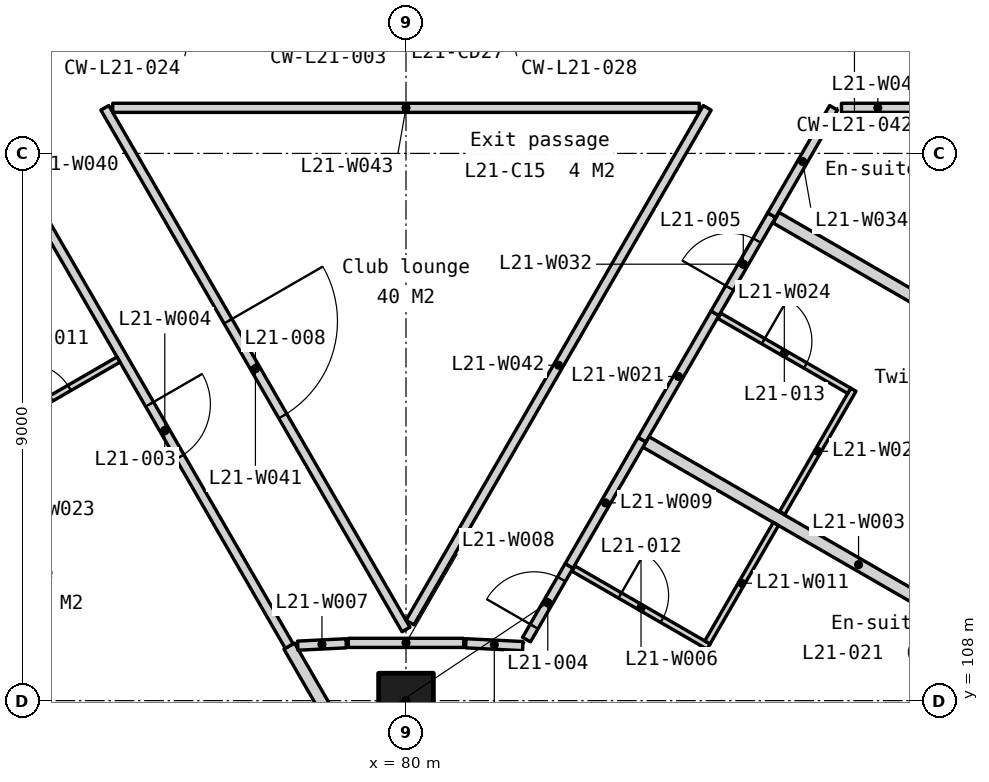
"""IFC4 building model, lengths in metres.
Left out: names, types, materials, properties, quantities, classifications, styles, units other than length and angle.
Written with IfcOpenShell. Run it as: python <this file> out.ifc"""

import sys

from ifc_helpers import new_model, si_unit, direction, frame, frame_2d, origin, origin_2d, place, context, subcontext, project, spatial, polyline, rectangle, outline, extrude, element, fill, save


model = new_model("IFC4")
c1 = context("Model", 3, precision=1e-05, world=origin(), true_north=direction((0.0, 1.0)))
c2 = subcontext(c1, "Body", "Model", "MODEL_VIEW")
j1 = project(units=[si_unit("LENGTHUNIT", "METRE"), si_unit("PLANEANGLEUNIT", "RADIAN")], contexts=[c1])
p1 = place(None, origin())
s1 = spatial("IfcSite", under=j1, at=p1, CompositionType="ELEMENT")
p2 = place(p1, origin())
s2 = spatial("IfcBuilding", under=s1, at=p2, CompositionType="ELEMENT")
p3 = place(p2, frame((0.0, 0.0, 88.8)))
s3 = spatial("IfcBuildingStorey", under=s2, at=p3, CompositionType="ELEMENT", Elevation=88.8)
p4 = place(p3, frame((80.0, 108.0, 0.0), z_axis=(0.0, 0.0, 1.0), x_axis=(1.0, 0.0, 0.0)))
e1 = element("IfcColumn", 1, at=p4, inside=s3, PredefinedType="COLUMN", context=c2, shape_type="SweptSolid", body=[
    extrude(rectangle(XDim=0.9, YDim=0.9, at=origin_2d()), origin(), (0.0, 0.0, 1.0), 3.5),
])
p5 = place(p3, frame((56.073, 130.263, -0.15), z_axis=(0.0, 0.0, 1.0), x_axis=(0.500000478905, -0.866025127289, 0.0)))
e2 = element("IfcWall", 2, at=p5, inside=s3, PredefinedType="SOLIDWALL", context=c2, shape_type="SweptSolid", body=[
    extrude(outline(polyline([(42.643, 0.0), (42.643, 3.5), (0.0, 3.5), (0.0, 0.0), (42.643, 0.0)])), frame((0.0, 0.225, 0.0), z_axis=(0.0, -1.0, 0.0), x_axis=(1.0, 0.0, 0.0)), (0.0, 0.0, 1.0), 0.45),
])
p6 = place(p5, frame((0.72, 0.0, 1.05)))
e3 = element("IfcOpeningElement", 3, at=p6, cuts=e2, PredefinedType="OPENING", context=c2, shape_type="SweptSolid", body=[
    extrude(rectangle(XDim=1.2, YDim=1.5, at=frame_2d((0.6, 0.75))), frame((0.0, 0.235, 0.0), z_axis=(0.0, -1.0, 0.0), x_axis=(1.0, 0.0, 0.0)), (0.0, 0.0, 1.0), 0.47),
])
p7 = place(p5, frame((7.079, 0.0, 1.05)))
e4 = element("IfcOpeningElement", 4, at=p7, cuts=e2, PredefinedType="OPENING", context=c2, shape_type="SweptSolid", body=[
    extrude(rectangle(XDim=1.2, YDim=1.5, at=frame_2d((0.6, 0.75))), frame((0.0, 0.235, 0.0), z_axis=(0.0, -1.0, 0.0), x_axis=(1.0, 0.0, 0.0)), (0.0, 0.0, 1.0), 0.47),
])
p8 = place(p5, frame((8.779, 0.0, 1.05)))
e5 = element("IfcOpeningElement", 5, at=p8, cuts=e2, PredefinedType="OPENING", context=c2, shape_type="SweptSolid", body=[
    extrude(rectangle(XDim=1.2, YDim=1.5, at=frame_2d((0.6, 0.75))), frame((0.0, 0.235, 0.0), z_axis=(0.0, -1.0, 0.0), x_axis=(1.0, 0.0, 0.0)), (0.0, 0.0, 1.0), 0.47),
])
p9 = place(p5, frame((15.607, 0.0, 1.05)))
e6 = element("IfcOpeningElement", 6, at=p9, cuts=e2, PredefinedType="OPENING", context=c2, shape_type="SweptSolid", body=[
    extrude(rectangle(XDim=1.2, YDim=1.5, at=frame_2d((0.6, 0.75))), frame((0.0, 0.235, 0.0), z_axis=(0.0, -1.0, 0.0), x_axis=(1.0, 0.0, 0.0)), (0.0, 0.0, 1.0), 0.47),
])
p10 = place(p5, frame((17.307, 0.0, 1.05)))
e7 = element("IfcOpeningElement", 7, at=p10, cuts=e2, PredefinedType="OPENING", context=c2, shape_type="SweptSolid", body=[
    extrude(rectangle(XDim=1.2, YDim=1.5, at=frame_2d((0.6, 0.75))), frame((0.0, 0.235, 0.0), z_axis=(0.0, -1.0, 0.0), x_axis=(1.0, 0.0, 0.0)), (0.0, 0.0, 1.0), 0.47),
])
p11 = place(p5, frame((24.136, 0.0, 1.05)))
e8 = element("IfcOpeningElement", 8, at=p11, cuts=e2, PredefinedType="OPENING", context=c2, shape_type="SweptSolid", body=[
    extrude(rectangle(XDim=1.2, YDim=1.5, at=frame_2d((0.6, 0.75))), frame((0.0, 0.235, 0.0), z_axis=(0.0, -1.0, 0.0), x_axis=(1.0, 0.0, 0.0)), (0.0, 0.0, 1.0), 0.47),
])
p12 = place(p5, frame((25.836, 0.0, 1.05)))
e9 = element("IfcOpeningElement", 9, at=p12, cuts=e2, PredefinedType="OPENING", context=c2, shape_type="SweptSolid", body=[
    extrude(rectangle(XDim=1.2, YDim=1.5, at=frame_2d((0.6, 0.75))), frame((0.0, 0.235, 0.0), z_axis=(0.0, -1.0, 0.0), x_axis=(1.0, 0.0, 0.0)), (0.0, 0.0, 1.0), 0.47),
])
p13 = place(p5, frame((32.665, 0.0, 1.05)))
e10 = element("IfcOpeningElement", 10, at=p13, cuts=e2, PredefinedType="OPENING", context=c2, shape_type="SweptSolid", body=[
    extrude(rectangle(XDim=1.2, YDim=1.5, at=frame_2d((0.6, 0.75))), frame((0.0, 0.235, 0.0), z_axis=(0.0, -1.0, 0.0), x_axis=(1.0, 0.0, 0.0)), (0.0, 0.0, 1.0), 0.47),
])
p14 = place(p5, frame((34.365, 0.0, 1.05)))
e11 = element("IfcOpeningElement", 11, at=p14, cuts=e2, PredefinedType="OPENING", context=c2, shape_type="SweptSolid", body=[
    extrude(rectangle(XDim=1.2, YDim=1.5, at=frame_2d((0.6, 0.75))), frame((0.0, 0.235, 0.0), z_axis=(0.0, -1.0, 0.0), x_axis=(1.0, 0.0, 0.0)), (0.0, 0.0, 1.0), 0.47),
])
p15 = place(p5, frame((40.722, 0.0, 1.05)))
e12 = element("IfcOpeningElement", 12, at=p15, cuts=e2, PredefinedType="OPENING", context=c2, shape_type="SweptSolid", body=[
    extrude(rectangle(XDim=1.2, YDim=1.5, at=frame_2d((0.6, 0.75))), frame((0.0, 0.235, 0.0), z_axis=(0.0, -1.0, 0.0), x_axis=(1.0, 0.0, 0.0)), (0.0, 0.0, 1.0), 0.47),
])
p16 = place(p3, frame((82.605, 93.333, -0.15), z_axis=(0.0, 0.0, 1.0), x_axis=(0.500000478905, 0.866025127289, 0.0)))
e13 = element("IfcWall", 13, at=p16, inside=s3, PredefinedType="SOLIDWALL", context=c2, shape_type="SweptSolid", body=[
    extrude(outline(polyline([(42.643, 0.0), (42.643, 3.5), (0.0, 3.5), (0.0, 0.0), (42.643, 0.0)])), frame((0.0, 0.225, 0.0), z_axis=(0.0, -1.0, 0.0), x_axis=(1.0, 0.0, 0.0)), (0.0, 0.0, 1.0), 0.45),
])
p17 = place(p16, frame((0.72, 0.0, 1.05)))
e14 = element("IfcOpeningElement", 14, at=p17, cuts=e13, PredefinedType="OPENING", context=c2, shape_type="SweptSolid", body=[
    extrude(rectangle(XDim=1.2, YDim=1.5, at=frame_2d((0.6, 0.75))), frame((0.0, 0.235, 0.0), z_axis=(0.0, -1.0, 0.0), x_axis=(1.0, 0.0, 0.0)), (0.0, 0.0, 1.0), 0.47),
])
p18 = place(p16, frame((7.079, 0.0, 1.05)))
e15 = element("IfcOpeningElement", 15, at=p18, cuts=e13, PredefinedType="OPENING", context=c2, shape_type="SweptSolid", body=[
    extrude(rectangle(XDim=1.2, YDim=1.5, at=frame_2d((0.6, 0.75))), frame((0.0, 0.235, 0.0), z_axis=(0.0, -1.0, 0.0), x_axis=(1.0, 0.0, 0.0)), (0.0, 0.0, 1.0), 0.47),
])
p19 = place(p16, frame((8.779, 0.0, 1.05)))
e16 = element("IfcOpeningElement", 16, at=p19, cuts=e13, PredefinedType="OPENING", context=c2, shape_type="SweptSolid", body=[
    extrude(rectangle(XDim=1.2, YDim=1.5, at=frame_2d((0.6, 0.75))), frame((0.0, 0.235, 0.0), z_axis=(0.0, -1.0, 0.0), x_axis=(1.0, 0.0, 0.0)), (0.0, 0.0, 1.0), 0.47),
])
p20 = place(p16, frame((15.607, 0.0, 1.05)))
e17 = element("IfcOpeningElement", 17, at=p20, cuts=e13, PredefinedType="OPENING", context=c2, shape_type="SweptSolid", body=[
    extrude(rectangle(XDim=1.2, YDim=1.5, at=frame_2d((0.6, 0.75))), frame((0.0, 0.235, 0.0), z_axis=(0.0, -1.0, 0.0), x_axis=(1.0, 0.0, 0.0)), (0.0, 0.0, 1.0), 0.47),
])
p21 = place(p16, frame((17.307, 0.0, 1.05)))
e18 = element("IfcOpeningElement", 18, at=p21, cuts=e13, PredefinedType="OPENING", context=c2, shape_type="SweptSolid", body=[
    extrude(rectangle(XDim=1.2, YDim=1.5, at=frame_2d((0.6, 0.75))), frame((0.0, 0.235, 0.0), z_axis=(0.0, -1.0, 0.0), x_axis=(1.0, 0.0, 0.0)), (0.0, 0.0, 1.0), 0.47),
])
p22 = place(p16, frame((24.136, 0.0, 1.05)))
e19 = element("IfcOpeningElement", 19, at=p22, cuts=e13, PredefinedType="OPENING", context=c2, shape_type="SweptSolid", body=[
    extrude(rectangle(XDim=1.2, YDim=1.5, at=frame_2d((0.6, 0.75))), frame((0.0, 0.235, 0.0), z_axis=(0.0, -1.0, 0.0), x_axis=(1.0, 0.0, 0.0)), (0.0, 0.0, 1.0), 0.47),
])
p23 = place(p16, frame((25.836, 0.0, 1.05)))
e20 = element("IfcOpeningElement", 20, at=p23, cuts=e13, PredefinedType="OPENING", context=c2, shape_type="SweptSolid", body=[
    extrude(rectangle(XDim=1.2, YDim=1.5, at=frame_2d((0.6, 0.75))), frame((0.0, 0.235, 0.0), z_axis=(0.0, -1.0, 0.0), x_axis=(1.0, 0.0, 0.0)), (0.0, 0.0, 1.0), 0.47),
])
p24 = place(p16, frame((32.665, 0.0, 1.05)))
e21 = element("IfcOpeningElement", 21, at=p24, cuts=e13, PredefinedType="OPENING", context=c2, shape_type="SweptSolid", body=[
    extrude(rectangle(XDim=1.2, YDim=1.5, at=frame_2d((0.6, 0.75))), frame((0.0, 0.235, 0.0), z_axis=(0.0, -1.0, 0.0), x_axis=(1.0, 0.0, 0.0)), (0.0, 0.0, 1.0), 0.47),
])
p25 = place(p16, frame((34.365, 0.0, 1.05)))
e22 = element("IfcOpeningElement", 22, at=p25, cuts=e13, PredefinedType="OPENING", context=c2, shape_type="SweptSolid", body=[
    extrude(rectangle(XDim=1.2, YDim=1.5, at=frame_2d((0.6, 0.75))), frame((0.0, 0.235, 0.0), z_axis=(0.0, -1.0, 0.0), x_axis=(1.0, 0.0, 0.0)), (0.0, 0.0, 1.0), 0.47),
])
p26 = place(p16, frame((40.722, 0.0, 1.05)))
e23 = element("IfcOpeningElement", 23, at=p26, cuts=e13, PredefinedType="OPENING", context=c2, shape_type="SweptSolid", body=[
    extrude(rectangle(XDim=1.2, YDim=1.5, at=frame_2d((0.6, 0.75))), frame((0.0, 0.235, 0.0), z_axis=(0.0, -1.0, 0.0), x_axis=(1.0, 0.0, 0.0)), (0.0, 0.0, 1.0), 0.47),
])
p27 = place(p3, frame((78.079, 108.897, 0.0), z_axis=(0.0, 0.0, 1.0), x_axis=(0.499981580887, -0.866036037803, 0.0)))
e24 = element("IfcWall", 24, at=p27, inside=s3, PredefinedType="PARTITIONING", context=c2, shape_type="SweptSolid", body=[
    extrude(rectangle(XDim=5.002, YDim=0.2, at=frame_2d((2.501, 0.0))), origin(), (0.0, 0.0, 1.0), 3.35),
])
p28 = place(p3, frame((83.946, 112.255, 0.0), z_axis=(0.0, 0.0, 1.0), x_axis=(0.86603353517, -0.499985915763, 0.0)))
e25 = element("IfcWall", 25, at=p28, inside=s3, PredefinedType="PARTITIONING", context=c2, shape_type="SweptSolid", body=[
    extrude(rectangle(XDim=8.075, YDim=0.2, at=frame_2d((4.038, 0.0))), origin(), (0.0, 0.0, 1.0), 3.35),
])
p29 = place(p3, frame((73.987, 115.985, 0.0), z_axis=(0.0, 0.0, 1.0), x_axis=(0.499995293736, -0.86602812093, 0.0)))
e26 = element("IfcWall", 26, at=p29, inside=s3, PredefinedType="PARTITIONING", context=c2, shape_type="SweptSolid", body=[
    extrude(rectangle(XDim=8.185, YDim=0.15, at=frame_2d((4.092, 0.0))), origin(), (0.0, 0.0, 1.0), 3.35),
])
p30 = place(p29, frame((3.592, 0.0, 0.0)))
e27 = element("IfcOpeningElement", 27, at=p30, cuts=e26, PredefinedType="OPENING", context=c2, shape_type="SweptSolid", body=[
    extrude(rectangle(XDim=1.0, YDim=2.1, at=frame_2d((0.5, 1.05))), frame((0.0, 0.085, 0.0), z_axis=(0.0, -1.0, 0.0), x_axis=(1.0, 0.0, 0.0)), (0.0, 0.0, 1.0), 0.17),
])
p31 = place(p3, frame((80.983, 108.943, 0.0), z_axis=(0.0, 0.0, 1.0), x_axis=(0.998790324739, -0.049172016508, 0.0)))
e28 = element("IfcWall", 28, at=p31, inside=s3, PredefinedType="PARTITIONING", context=c2, shape_type="SweptSolid", body=[
    extrude(rectangle(XDim=0.938, YDim=0.15, at=frame_2d((0.469, 0.0))), origin(), (0.0, 0.0, 1.0), 3.35),
])
p32 = place(p3, frame((82.754, 110.171, 0.0), z_axis=(0.0, 0.0, 1.0), x_axis=(0.866038183914, -0.499977863513, 0.0)))
e29 = element("IfcWall", 29, at=p32, inside=s3, PredefinedType="PARTITIONING", context=c2, shape_type="SweptSolid", body=[
    extrude(rectangle(XDim=2.565, YDim=0.1, at=frame_2d((1.282, 0.0))), origin(), (0.0, 0.0, 1.0), 3.35),
])
p33 = place(p32, frame((0.883, 0.0, 0.0)))
e30 = element("IfcOpeningElement", 30, at=p33, cuts=e29, PredefinedType="OPENING", context=c2, shape_type="SweptSolid", body=[
    extrude(rectangle(XDim=0.8, YDim=2.1, at=frame_2d((0.4, 1.05))), frame((0.0, 0.06, 0.0), z_axis=(0.0, -1.0, 0.0), x_axis=(1.0, 0.0, 0.0)), (0.0, 0.0, 1.0), 0.12),
])
p34 = place(p3, frame((78.219, 108.904, 0.0), z_axis=(0.0, 0.0, 1.0), x_axis=(0.998787173297, 0.049235987416, 0.0)))
e31 = element("IfcWall", 31, at=p34, inside=s3, PredefinedType="PARTITIONING", context=c2, shape_type="SweptSolid", body=[
    extrude(rectangle(XDim=0.798, YDim=0.15, at=frame_2d((0.399, 0.0))), origin(), (0.0, 0.0, 1.0), 3.35),
])
p35 = place(p3, frame((79.05, 108.95, 0.0), z_axis=(0.0, 0.0, 1.0), x_axis=(1.0, 0.0, 0.0)))
e32 = element("IfcWall", 32, at=p35, inside=s3, PredefinedType="PARTITIONING", context=c2, shape_type="SweptSolid", body=[
    extrude(rectangle(XDim=1.9, YDim=0.15, at=frame_2d((0.95, 0.0))), origin(), (0.0, 0.0, 1.0), 3.35),
])
p36 = place(p3, frame((82.681, 110.214, 0.0), z_axis=(0.0, 0.0, 1.0), x_axis=(0.500001309137, 0.866024647952, 0.0)))
e33 = element("IfcWall", 33, at=p36, inside=s3, PredefinedType="PARTITIONING", context=c2, shape_type="SweptSolid", body=[
    extrude(rectangle(XDim=2.4, YDim=0.15, at=frame_2d((1.2, 0.0))), origin(), (0.0, 0.0, 1.0), 3.35),
])
p37 = place(p3, frame((81.982, 109.004, 0.0), z_axis=(0.0, 0.0, 1.0), x_axis=(0.500009789943, 0.866019751484, 0.0)))
e34 = element("IfcWall", 34, at=p37, inside=s3, PredefinedType="PARTITIONING", context=c2, shape_type="SweptSolid", body=[
    extrude(rectangle(XDim=1.397, YDim=0.15, at=frame_2d((0.699, 0.0))), origin(), (0.0, 0.0, 1.0), 3.35),
])
p38 = place(p37, frame((0.249, 0.0, 0.0)))
e35 = element("IfcOpeningElement", 35, at=p38, cuts=e34, PredefinedType="OPENING", context=c2, shape_type="SweptSolid", body=[
    extrude(rectangle(XDim=0.9, YDim=2.1, at=frame_2d((0.45, 1.05))), frame((0.0, 0.085, 0.0), z_axis=(0.0, -1.0, 0.0), x_axis=(1.0, 0.0, 0.0)), (0.0, 0.0, 1.0), 0.17),
])
p39 = place(p3, frame((84.958, 108.957, 0.0), z_axis=(0.0, 0.0, 1.0), x_axis=(0.499966648284, 0.866044658551, 0.0)))
e36 = element("IfcWall", 36, at=p39, inside=s3, PredefinedType="PARTITIONING", context=c2, shape_type="SweptSolid", body=[
    extrude(rectangle(XDim=2.25, YDim=0.1, at=frame_2d((1.125, 0.0))), origin(), (0.0, 0.0, 1.0), 3.35),
])
p40 = place(p3, frame((86.087, 115.943, 0.0), z_axis=(0.0, 0.0, 1.0), x_axis=(0.866010152247, -0.500026415507, 0.0)))
e37 = element("IfcWall", 37, at=p40, inside=s3, PredefinedType="PARTITIONING", context=c2, shape_type="SweptSolid", body=[
    extrude(rectangle(XDim=8.065, YDim=0.2, at=frame_2d((4.032, 0.0))), origin(), (0.0, 0.0, 1.0), 3.35),
])
p41 = place(p3, frame((83.881, 112.292, 0.0), z_axis=(0.0, 0.0, 1.0), x_axis=(0.500001309137, 0.866024647952, 0.0)))
e38 = element("IfcWall", 38, at=p41, inside=s3, PredefinedType="PARTITIONING", context=c2, shape_type="SweptSolid", body=[
    extrude(rectangle(XDim=2.4, YDim=0.15, at=frame_2d((1.2, 0.0))), origin(), (0.0, 0.0, 1.0), 3.35),
])
p42 = place(p3, frame((86.188, 111.088, 0.0), z_axis=(0.0, 0.0, 1.0), x_axis=(0.499999433879, 0.866025730634, 0.0)))
e39 = element("IfcWall", 39, at=p42, inside=s3, PredefinedType="PARTITIONING", context=c2, shape_type="SweptSolid", body=[
    extrude(rectangle(XDim=2.34, YDim=0.1, at=frame_2d((1.17, 0.0))), origin(), (0.0, 0.0, 1.0), 3.35),
])
p43 = place(p3, frame((72.964, 112.277, 0.0), z_axis=(0.0, 0.0, 1.0), x_axis=(0.866075755805, 0.4999127776, 0.0)))
e40 = element("IfcWall", 40, at=p43, inside=s3, PredefinedType="PARTITIONING", context=c2, shape_type="SweptSolid", body=[
    extrude(rectangle(XDim=2.665, YDim=0.1, at=frame_2d((1.333, 0.0))), origin(), (0.0, 0.0, 1.0), 3.35),
])
p44 = place(p43, frame((0.933, 0.0, 0.0)))
e41 = element("IfcOpeningElement", 41, at=p44, cuts=e40, PredefinedType="OPENING", context=c2, shape_type="SweptSolid", body=[
    extrude(rectangle(XDim=0.8, YDim=2.1, at=frame_2d((0.4, 1.05))), frame((0.0, 0.06, 0.0), z_axis=(0.0, -1.0, 0.0), x_axis=(1.0, 0.0, 0.0)), (0.0, 0.0, 1.0), 0.12),
])
p45 = place(p3, frame((85.154, 114.328, 0.0), z_axis=(0.0, 0.0, 1.0), x_axis=(0.866040446274, -0.499973944738, 0.0)))
e42 = element("IfcWall", 42, at=p45, inside=s3, PredefinedType="PARTITIONING", context=c2, shape_type="SweptSolid", body=[
    extrude(rectangle(XDim=2.465, YDim=0.1, at=frame_2d((1.232, 0.0))), origin(), (0.0, 0.0, 1.0), 3.35),
])
p46 = place(p45, frame((0.833, 0.0, 0.0)))
e43 = element("IfcOpeningElement", 43, at=p46, cuts=e42, PredefinedType="OPENING", context=c2, shape_type="SweptSolid", body=[
    extrude(rectangle(XDim=0.8, YDim=2.1, at=frame_2d((0.4, 1.05))), frame((0.0, 0.06, 0.0), z_axis=(0.0, -1.0, 0.0), x_axis=(1.0, 0.0, 0.0)), (0.0, 0.0, 1.0), 0.12),
])
p47 = place(p3, frame((85.081, 114.371, 0.0), z_axis=(0.0, 0.0, 1.0), x_axis=(0.499941596792, 0.866059120267, 0.0)))
e44 = element("IfcWall", 44, at=p47, inside=s3, PredefinedType="PARTITIONING", context=c2, shape_type="SweptSolid", body=[
    extrude(rectangle(XDim=1.865, YDim=0.15, at=frame_2d((0.932, 0.0))), origin(), (0.0, 0.0, 1.0), 3.35),
])
p48 = place(p47, frame((0.482, 0.0, 0.0)))
e45 = element("IfcOpeningElement", 45, at=p48, cuts=e44, PredefinedType="OPENING", context=c2, shape_type="SweptSolid", body=[
    extrude(rectangle(XDim=0.9, YDim=2.1, at=frame_2d((0.45, 1.05))), frame((0.0, 0.085, 0.0), z_axis=(0.0, -1.0, 0.0), x_axis=(1.0, 0.0, 0.0)), (0.0, 0.0, 1.0), 0.17),
])
p49 = place(p3, frame((86.013, 115.985, 0.0), z_axis=(0.0, 0.0, 1.0), x_axis=(0.499992114976, 0.866029956157, 0.0)))
e46 = element("IfcWall", 46, at=p49, inside=s3, PredefinedType="PARTITIONING", context=c2, shape_type="SweptSolid", body=[
    extrude(rectangle(XDim=2.038, YDim=0.15, at=frame_2d((1.019, 0.0))), origin(), (0.0, 0.0, 1.0), 3.35),
])
p50 = place(p3, frame((75.047, 117.75, 0.0), z_axis=(0.0, 0.0, 1.0), x_axis=(0.499995505729, -0.866027998537, 0.0)))
e47 = element("IfcWall", 47, at=p50, inside=s3, PredefinedType="PARTITIONING", context=c2, shape_type="SweptSolid", body=[
    extrude(rectangle(XDim=9.907, YDim=0.15, at=frame_2d((4.953, 0.0))), origin(), (0.0, 0.0, 1.0), 3.35),
])
p51 = place(p50, frame((4.053, 0.0, 0.0)))
e48 = element("IfcOpeningElement", 48, at=p51, cuts=e47, PredefinedType="OPENING", context=c2, shape_type="SweptSolid", body=[
    extrude(rectangle(XDim=1.8, YDim=2.1, at=frame_2d((0.9, 1.05))), frame((0.0, 0.085, 0.0), z_axis=(0.0, -1.0, 0.0), x_axis=(1.0, 0.0, 0.0)), (0.0, 0.0, 1.0), 0.17),
])
p52 = place(p3, frame((80.065, 109.283, 0.0), z_axis=(0.0, 0.0, 1.0), x_axis=(0.49999841397, 0.866026319477, 0.0)))
e49 = element("IfcWall", 49, at=p52, inside=s3, PredefinedType="PARTITIONING", context=c2, shape_type="SweptSolid", body=[
    extrude(rectangle(XDim=9.777, YDim=0.15, at=frame_2d((4.888, 0.0))), origin(), (0.0, 0.0, 1.0), 3.35),
])
p53 = place(p3, frame((75.177, 117.75, 0.0), z_axis=(0.0, 0.0, 1.0), x_axis=(1.0, 0.0, 0.0)))
e50 = element("IfcWall", 50, at=p53, inside=s3, PredefinedType="PARTITIONING", context=c2, shape_type="SweptSolid", body=[
    extrude(rectangle(XDim=9.647, YDim=0.15, at=frame_2d((4.823, 0.0))), origin(), (0.0, 0.0, 1.0), 3.35),
])
p54 = place(p3, frame((87.162, 117.75, 0.0), z_axis=(0.0, 0.0, 1.0), x_axis=(1.0, 0.0, 0.0)))
e51 = element("IfcWall", 51, at=p54, inside=s3, PredefinedType="PARTITIONING", context=c2, shape_type="SweptSolid", body=[
    extrude(rectangle(XDim=1.195, YDim=0.15, at=frame_2d((0.597, 0.0))), origin(), (0.0, 0.0, 1.0), 3.35),
])
p55 = place(p30, origin())
e52 = element("IfcDoor", 52, at=p55, inside=s3, OperationType="SINGLE_SWING_LEFT", PredefinedType="DOOR", context=c2, shape_type="SweptSolid", body=[
    extrude(rectangle(XDim=1.0, YDim=2.1, at=frame_2d((0.5, 1.05))), frame((0.0, 0.025, 0.0), z_axis=(0.0, -1.0, 0.0), x_axis=(1.0, 0.0, 0.0)), (0.0, 0.0, 1.0), 0.05),
])
fill(e27, e52)
p56 = place(p38, origin())
e53 = element("IfcDoor", 53, at=p56, inside=s3, OperationType="SINGLE_SWING_LEFT", PredefinedType="DOOR", context=c2, shape_type="SweptSolid", body=[
    extrude(rectangle(XDim=0.9, YDim=2.1, at=frame_2d((0.45, 1.05))), frame((0.0, 0.025, 0.0), z_axis=(0.0, -1.0, 0.0), x_axis=(1.0, 0.0, 0.0)), (0.0, 0.0, 1.0), 0.05),
])
fill(e35, e53)
p57 = place(p48, origin())
e54 = element("IfcDoor", 54, at=p57, inside=s3, OperationType="SINGLE_SWING_LEFT", PredefinedType="DOOR", context=c2, shape_type="SweptSolid", body=[
    extrude(rectangle(XDim=0.9, YDim=2.1, at=frame_2d((0.45, 1.05))), frame((0.0, 0.025, 0.0), z_axis=(0.0, -1.0, 0.0), x_axis=(1.0, 0.0, 0.0)), (0.0, 0.0, 1.0), 0.05),
])
fill(e45, e54)
p58 = place(p51, origin())
e55 = element("IfcDoor", 55, at=p58, inside=s3, OperationType="SINGLE_SWING_LEFT", PredefinedType="DOOR", context=c2, shape_type="SweptSolid", body=[
    extrude(rectangle(XDim=1.8, YDim=2.1, at=frame_2d((0.9, 1.05))), frame((0.0, 0.025, 0.0), z_axis=(0.0, -1.0, 0.0), x_axis=(1.0, 0.0, 0.0)), (0.0, 0.0, 1.0), 0.05),
])
fill(e48, e55)
p59 = place(p44, origin())
e56 = element("IfcDoor", 56, at=p59, inside=s3, OperationType="SINGLE_SWING_LEFT", PredefinedType="DOOR", context=c2, shape_type="SweptSolid", body=[
    extrude(rectangle(XDim=0.8, YDim=2.1, at=frame_2d((0.4, 1.05))), frame((0.0, 0.025, 0.0), z_axis=(0.0, -1.0, 0.0), x_axis=(1.0, 0.0, 0.0)), (0.0, 0.0, 1.0), 0.05),
])
fill(e41, e56)
p60 = place(p33, origin())
e57 = element("IfcDoor", 57, at=p60, inside=s3, OperationType="SINGLE_SWING_LEFT", PredefinedType="DOOR", context=c2, shape_type="SweptSolid", body=[
    extrude(rectangle(XDim=0.8, YDim=2.1, at=frame_2d((0.4, 1.05))), frame((0.0, 0.025, 0.0), z_axis=(0.0, -1.0, 0.0), x_axis=(1.0, 0.0, 0.0)), (0.0, 0.0, 1.0), 0.05),
])
fill(e30, e57)
p61 = place(p46, origin())
e58 = element("IfcDoor", 58, at=p61, inside=s3, OperationType="SINGLE_SWING_LEFT", PredefinedType="DOOR", context=c2, shape_type="SweptSolid", body=[
    extrude(rectangle(XDim=0.8, YDim=2.1, at=frame_2d((0.4, 1.05))), frame((0.0, 0.025, 0.0), z_axis=(0.0, -1.0, 0.0), x_axis=(1.0, 0.0, 0.0)), (0.0, 0.0, 1.0), 0.05),
])
fill(e43, e58)
save(model, sys.argv[1])
